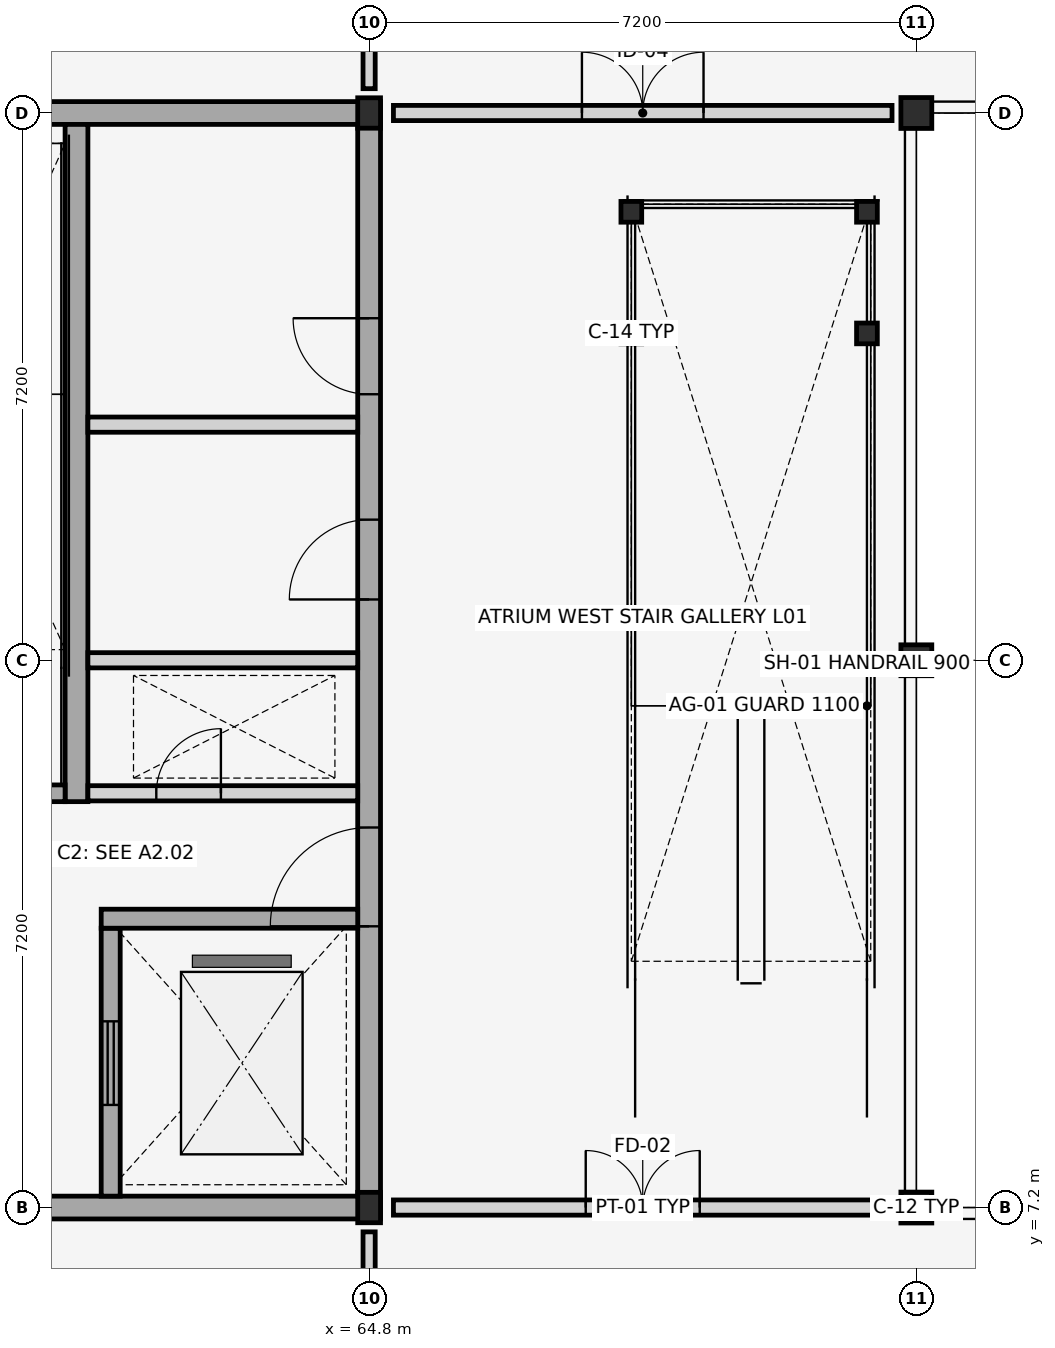
"""IFC4 building model, lengths in metres.
Left out: names, types, materials, properties, quantities, classifications, styles, units other than length and angle.
Written with IfcOpenShell. Run it as: python <this file> out.ifc"""

import sys

from ifc_helpers import new_model, si_unit, direction, frame, frame_2d, origin, origin_2d, place, context, subcontext, project, spatial, rectangle, hollow_circle, i_section, extrude, element, fill, save


model = new_model("IFC4")
c1 = context("Model", 3, precision=1e-05, world=origin(), true_north=direction((0.0, 1.0)))
c2 = subcontext(c1, "Body", "Model", "MODEL_VIEW")
j1 = project(units=[si_unit("LENGTHUNIT", "METRE"), si_unit("PLANEANGLEUNIT", "RADIAN")], contexts=[c1])
p1 = place(None, origin())
s1 = spatial("IfcSite", under=j1, at=p1, CompositionType="ELEMENT")
p2 = place(p1, origin())
s2 = spatial("IfcBuilding", under=s1, at=p2, CompositionType="ELEMENT")
p3 = place(p2, frame((0.0, 0.0, 4.5)))
s3 = spatial("IfcBuildingStorey", under=s2, at=p3, CompositionType="ELEMENT", Elevation=4.5)
for number, where, z_axis, x_axis in (
    (1, (64.8, 7.2, 0.0), (0.0, 0.0, 1.0), (1.0, 0.0, 0.0)),
    (2, (64.8, 21.6, 0.0), (0.0, 0.0, 1.0), (1.0, 0.0, 0.0)),
):
    element("IfcColumn", number, at=place(p3, frame(where, z_axis=z_axis, x_axis=x_axis)), inside=s3, PredefinedType="COLUMN", context=c2, shape_type="SweptSolid", body=[
        extrude(i_section(OverallWidth=0.3, OverallDepth=0.4, WebThickness=0.013, FlangeThickness=0.024, FilletRadius=0.027, at=origin_2d()), origin(), (0.0, 0.0, 1.0), 4.2),
    ])
for number, where, z_axis, x_axis in (
    (3, (72.0, 7.2, 0.0), (0.0, 0.0, 1.0), (0.0, 1.0, 0.0)),
    (4, (72.0, 14.4, 0.0), (0.0, 0.0, 1.0), (1.0, 0.0, 0.0)),
    (5, (72.0, 21.6, 0.0), (0.0, 0.0, 1.0), (0.0, 1.0, 0.0)),
):
    element("IfcColumn", number, at=place(p3, frame(where, z_axis=z_axis, x_axis=x_axis)), inside=s3, PredefinedType="COLUMN", context=c2, shape_type="SweptSolid", body=[
        extrude(hollow_circle(Radius=0.203, WallThickness=0.016, at=origin_2d()), origin(), (0.0, 0.0, 1.0), 4.2),
    ])
for number, where, z_axis, x_axis in (
    (6, (57.6, 7.2, 0.0), (0.0, 0.0, 1.0), (1.0, 0.0, 0.0)),
    (7, (57.6, 21.6, 0.0), (0.0, 0.0, 1.0), (1.0, 0.0, 0.0)),
):
    element("IfcWall", number, at=place(p3, frame(where, z_axis=z_axis, x_axis=x_axis)), inside=s3, PredefinedType="SHEAR", context=c2, shape_type="SweptSolid", body=[
        extrude(rectangle(XDim=7.35, YDim=0.3, at=frame_2d((3.675, 0.0))), origin(), (0.0, 0.0, 1.0), 3.98),
    ])
p4 = place(p3, frame((64.8, 7.35, 0.0), z_axis=(0.0, 0.0, 1.0), x_axis=(0.0, 1.0, 0.0)))
e8 = element("IfcWall", 8, at=p4, inside=s3, PredefinedType="SHEAR", context=c2, shape_type="SweptSolid", body=[
    extrude(rectangle(XDim=14.1, YDim=0.3, at=frame_2d((7.05, 0.0))), origin(), (0.0, 0.0, 1.0), 3.98),
])
p5 = place(p4, frame((3.55, 0.0, 0.0)))
e9 = element("IfcOpeningElement", 9, at=p5, cuts=e8, PredefinedType="OPENING", context=c2, shape_type="SweptSolid", body=[
    extrude(rectangle(XDim=1.3, YDim=2.2, at=frame_2d((0.65, 1.1))), frame((0.0, 0.16, 0.0), z_axis=(0.0, -1.0, 0.0), x_axis=(1.0, 0.0, 0.0)), (0.0, 0.0, 1.0), 0.32),
])
p6 = place(p4, frame((7.85, 0.0, 0.0)))
e10 = element("IfcOpeningElement", 10, at=p6, cuts=e8, PredefinedType="OPENING", context=c2, shape_type="SweptSolid", body=[
    extrude(rectangle(XDim=1.05, YDim=2.15, at=frame_2d((0.525, 1.075))), frame((0.0, 0.16, 0.0), z_axis=(0.0, -1.0, 0.0), x_axis=(1.0, 0.0, 0.0)), (0.0, 0.0, 1.0), 0.32),
])
p7 = place(p4, frame((10.55, 0.0, 0.0)))
e11 = element("IfcOpeningElement", 11, at=p7, cuts=e8, PredefinedType="OPENING", context=c2, shape_type="SweptSolid", body=[
    extrude(rectangle(XDim=1.0, YDim=2.15, at=frame_2d((0.5, 1.075))), frame((0.0, 0.16, 0.0), z_axis=(0.0, -1.0, 0.0), x_axis=(1.0, 0.0, 0.0)), (0.0, 0.0, 1.0), 0.32),
])
p8 = place(p3, frame((61.4, 7.35, 0.0), z_axis=(0.0, 0.0, 1.0), x_axis=(0.0, 1.0, 0.0)))
e12 = element("IfcWall", 12, at=p8, inside=s3, PredefinedType="SHEAR", context=c2, shape_type="SweptSolid", body=[
    extrude(rectangle(XDim=3.525, YDim=0.25, at=frame_2d((1.762, 0.0))), origin(), (0.0, 0.0, 1.0), 3.98),
])
p9 = place(p8, frame((1.2, 0.0, 0.0)))
e13 = element("IfcOpeningElement", 13, at=p9, cuts=e12, PredefinedType="OPENING", context=c2, shape_type="SweptSolid", body=[
    extrude(rectangle(XDim=1.1, YDim=2.15, at=frame_2d((0.55, 1.075))), frame((0.0, 0.135, 0.0), z_axis=(0.0, -1.0, 0.0), x_axis=(1.0, 0.0, 0.0)), (0.0, 0.0, 1.0), 0.27),
])
p10 = place(p3, frame((60.95, 12.54, 0.0), z_axis=(0.0, 0.0, 1.0), x_axis=(0.0, 1.0, 0.0)))
e14 = element("IfcWall", 14, at=p10, inside=s3, PredefinedType="SHEAR", context=c2, shape_type="SweptSolid", body=[
    extrude(rectangle(XDim=8.91, YDim=0.3, at=frame_2d((4.455, 0.0))), origin(), (0.0, 0.0, 1.0), 3.98),
])
p11 = place(p3, frame((61.1, 12.65, 0.0), z_axis=(0.0, 0.0, 1.0), x_axis=(1.0, 0.0, 0.0)))
e15 = element("IfcWall", 15, at=p11, inside=s3, PredefinedType="PLUMBINGWALL", context=c2, shape_type="SweptSolid", body=[
    extrude(rectangle(XDim=3.55, YDim=0.2, at=frame_2d((1.775, 0.0))), origin(), (0.0, 0.0, 1.0), 3.4),
])
p12 = place(p11, frame((0.9, 0.0, 0.0)))
e16 = element("IfcOpeningElement", 16, at=p12, cuts=e15, PredefinedType="OPENING", context=c2, shape_type="SweptSolid", body=[
    extrude(rectangle(XDim=0.85, YDim=2.05, at=frame_2d((0.425, 1.025))), frame((0.0, 0.11, 0.0), z_axis=(0.0, -1.0, 0.0), x_axis=(1.0, 0.0, 0.0)), (0.0, 0.0, 1.0), 0.22),
])
p13 = place(p3, frame((57.9, 12.65, 0.0), z_axis=(0.0, 0.0, 1.0), x_axis=(1.0, 0.0, 0.0)))
e17 = element("IfcWall", 17, at=p13, inside=s3, PredefinedType="SHEAR", context=c2, shape_type="SweptSolid", body=[
    extrude(rectangle(XDim=2.9, YDim=0.22, at=frame_2d((1.45, 0.0))), origin(), (0.0, 0.0, 1.0), 3.98),
])
p14 = place(p13, frame((0.75, 0.0, 0.0)))
e18 = element("IfcOpeningElement", 18, at=p14, cuts=e17, PredefinedType="OPENING", context=c2, shape_type="SweptSolid", body=[
    extrude(rectangle(XDim=1.3, YDim=2.2, at=frame_2d((0.65, 1.1))), frame((0.0, 0.12, 0.0), z_axis=(0.0, -1.0, 0.0), x_axis=(1.0, 0.0, 0.0)), (0.0, 0.0, 1.0), 0.24),
])
p15 = place(p3, frame((61.275, 11.0, 0.0), z_axis=(0.0, 0.0, 1.0), x_axis=(1.0, 0.0, 0.0)))
e19 = element("IfcWall", 19, at=p15, inside=s3, PredefinedType="SHEAR", context=c2, shape_type="SweptSolid", body=[
    extrude(rectangle(XDim=3.375, YDim=0.25, at=frame_2d((1.688, 0.0))), origin(), (0.0, 0.0, 1.0), 3.98),
])
for number, where, z_axis, x_axis in (
    (20, (61.1, 14.4, 0.0), (0.0, 0.0, 1.0), (1.0, 0.0, 0.0)),
    (21, (61.1, 17.5, 0.0), (0.0, 0.0, 1.0), (1.0, 0.0, 0.0)),
):
    element("IfcWall", number, at=place(p3, frame(where, z_axis=z_axis, x_axis=x_axis)), inside=s3, PredefinedType="PLUMBINGWALL", context=c2, shape_type="SweptSolid", body=[
        extrude(rectangle(XDim=3.55, YDim=0.2, at=frame_2d((1.775, 0.0))), origin(), (0.0, 0.0, 1.0), 3.4),
    ])
for number, where, z_axis, x_axis in (
    (22, (68.25, 18.7, 0.0), (0.0, 0.0, 1.0), (1.0, 0.0, 0.0)),
    (23, (71.35, 18.7, 0.0), (0.0, 0.0, 1.0), (1.0, 0.0, 0.0)),
    (24, (68.25, 20.3, 0.0), (0.0, 0.0, 1.0), (1.0, 0.0, 0.0)),
    (25, (71.35, 20.3, 0.0), (0.0, 0.0, 1.0), (1.0, 0.0, 0.0)),
):
    element("IfcColumn", number, at=place(p3, frame(where, z_axis=z_axis, x_axis=x_axis)), inside=s3, PredefinedType="COLUMN", context=c2, shape_type="SweptSolid", body=[
        extrude(hollow_circle(Radius=0.136, WallThickness=0.012, at=origin_2d()), origin(), (0.0, 0.0, 1.0), 4.2),
    ])
p16 = place(p3, frame((65.12, 7.2, 0.0), z_axis=(0.0, 0.0, 1.0), x_axis=(1.0, 0.0, 0.0)))
e26 = element("IfcWall", 26, at=p16, inside=s3, PredefinedType="PARTITIONING", context=c2, shape_type="SweptSolid", body=[
    extrude(rectangle(XDim=6.56, YDim=0.2, at=frame_2d((3.28, 0.0))), origin(), (0.0, 0.0, 1.0), 3.15),
])
p17 = place(p16, frame((2.53, 0.0, 0.0)))
e27 = element("IfcOpeningElement", 27, at=p17, cuts=e26, PredefinedType="OPENING", context=c2, shape_type="SweptSolid", body=[
    extrude(rectangle(XDim=1.5, YDim=2.25, at=frame_2d((0.75, 1.125))), frame((0.0, 0.11, 0.0), z_axis=(0.0, -1.0, 0.0), x_axis=(1.0, 0.0, 0.0)), (0.0, 0.0, 1.0), 0.22),
])
p18 = place(p3, frame((65.12, 21.6, 0.0), z_axis=(0.0, 0.0, 1.0), x_axis=(1.0, 0.0, 0.0)))
e28 = element("IfcWall", 28, at=p18, inside=s3, PredefinedType="PARTITIONING", context=c2, shape_type="SweptSolid", body=[
    extrude(rectangle(XDim=6.56, YDim=0.2, at=frame_2d((3.28, 0.0))), origin(), (0.0, 0.0, 1.0), 3.15),
])
p19 = place(p18, frame((2.48, 0.0, 0.0)))
e29 = element("IfcOpeningElement", 29, at=p19, cuts=e28, PredefinedType="OPENING", context=c2, shape_type="SweptSolid", body=[
    extrude(rectangle(XDim=1.6, YDim=2.35, at=frame_2d((0.8, 1.175))), frame((0.0, 0.11, 0.0), z_axis=(0.0, -1.0, 0.0), x_axis=(1.0, 0.0, 0.0)), (0.0, 0.0, 1.0), 0.22),
])
p20 = place(p3, frame((64.8, 0.32, 0.0), z_axis=(0.0, 0.0, 1.0), x_axis=(0.0, 1.0, 0.0)))
e30 = element("IfcWall", 30, at=p20, inside=s3, PredefinedType="PARTITIONING", context=c2, shape_type="SweptSolid", body=[
    extrude(rectangle(XDim=6.56, YDim=0.16, at=frame_2d((3.28, 0.0))), origin(), (0.0, 0.0, 1.0), 3.15),
])
p21 = place(p20, frame((2.53, 0.0, 0.0)))
e31 = element("IfcOpeningElement", 31, at=p21, cuts=e30, PredefinedType="OPENING", context=c2, shape_type="SweptSolid", body=[
    extrude(rectangle(XDim=1.5, YDim=2.5, at=frame_2d((0.75, 1.25))), frame((0.0, 0.09, 0.0), z_axis=(0.0, -1.0, 0.0), x_axis=(1.0, 0.0, 0.0)), (0.0, 0.0, 1.0), 0.18),
])
p22 = place(p3, frame((64.8, 21.92, 0.0), z_axis=(0.0, 0.0, 1.0), x_axis=(0.0, 1.0, 0.0)))
e32 = element("IfcWall", 32, at=p22, inside=s3, PredefinedType="PARTITIONING", context=c2, shape_type="SweptSolid", body=[
    extrude(rectangle(XDim=6.56, YDim=0.16, at=frame_2d((3.28, 0.0))), origin(), (0.0, 0.0, 1.0), 3.15),
])
p23 = place(p22, frame((2.38, 0.0, 0.0)))
e33 = element("IfcOpeningElement", 33, at=p23, cuts=e32, PredefinedType="OPENING", context=c2, shape_type="SweptSolid", body=[
    extrude(rectangle(XDim=1.8, YDim=2.55, at=frame_2d((0.9, 1.275))), frame((0.0, 0.09, 0.0), z_axis=(0.0, -1.0, 0.0), x_axis=(1.0, 0.0, 0.0)), (0.0, 0.0, 1.0), 0.18),
])
p24 = place(p5, origin())
e34 = element("IfcDoor", 34, at=p24, inside=s3, OperationType="SINGLE_SWING_LEFT", PredefinedType="DOOR", context=c2, shape_type="SweptSolid", body=[
    extrude(rectangle(XDim=1.3, YDim=2.2, at=frame_2d((0.65, 1.1))), frame((0.0, 0.025, 0.0), z_axis=(0.0, -1.0, 0.0), x_axis=(1.0, 0.0, 0.0)), (0.0, 0.0, 1.0), 0.05),
])
fill(e9, e34)
p25 = place(p6, origin())
e35 = element("IfcDoor", 35, at=p25, inside=s3, OperationType="SINGLE_SWING_LEFT", PredefinedType="DOOR", context=c2, shape_type="SweptSolid", body=[
    extrude(rectangle(XDim=1.05, YDim=2.15, at=frame_2d((0.525, 1.075))), frame((0.0, 0.025, 0.0), z_axis=(0.0, -1.0, 0.0), x_axis=(1.0, 0.0, 0.0)), (0.0, 0.0, 1.0), 0.05),
])
fill(e10, e35)
p26 = place(p7, origin())
e36 = element("IfcDoor", 36, at=p26, inside=s3, OperationType="SINGLE_SWING_RIGHT", PredefinedType="DOOR", context=c2, shape_type="SweptSolid", body=[
    extrude(rectangle(XDim=1.0, YDim=2.15, at=frame_2d((0.5, 1.075))), frame((0.0, 0.025, 0.0), z_axis=(0.0, -1.0, 0.0), x_axis=(1.0, 0.0, 0.0)), (0.0, 0.0, 1.0), 0.05),
])
fill(e11, e36)
p27 = place(p9, origin())
e37 = element("IfcDoor", 37, at=p27, inside=s3, OperationType="SLIDING_TO_LEFT", PredefinedType="DOOR", context=c2, shape_type="SweptSolid", body=[
    extrude(rectangle(XDim=1.1, YDim=2.15, at=frame_2d((0.55, 1.075))), frame((0.0, 0.025, 0.0), z_axis=(0.0, -1.0, 0.0), x_axis=(1.0, 0.0, 0.0)), (0.0, 0.0, 1.0), 0.05),
])
fill(e13, e37)
p28 = place(p12, origin())
e38 = element("IfcDoor", 38, at=p28, inside=s3, OperationType="SINGLE_SWING_RIGHT", PredefinedType="TRAPDOOR", context=c2, shape_type="SweptSolid", body=[
    extrude(rectangle(XDim=0.85, YDim=2.05, at=frame_2d((0.425, 1.025))), frame((0.0, 0.025, 0.0), z_axis=(0.0, -1.0, 0.0), x_axis=(1.0, 0.0, 0.0)), (0.0, 0.0, 1.0), 0.05),
])
fill(e16, e38)
p29 = place(p17, origin())
e39 = element("IfcDoor", 39, at=p29, inside=s3, OperationType="DOUBLE_DOOR_SINGLE_SWING", PredefinedType="DOOR", context=c2, shape_type="SweptSolid", body=[
    extrude(rectangle(XDim=1.5, YDim=2.25, at=frame_2d((0.75, 1.125))), frame((0.0, 0.025, 0.0), z_axis=(0.0, -1.0, 0.0), x_axis=(1.0, 0.0, 0.0)), (0.0, 0.0, 1.0), 0.05),
])
fill(e27, e39)
p30 = place(p19, origin())
e40 = element("IfcDoor", 40, at=p30, inside=s3, OperationType="DOUBLE_DOOR_SINGLE_SWING", PredefinedType="DOOR", context=c2, shape_type="SweptSolid", body=[
    extrude(rectangle(XDim=1.6, YDim=2.35, at=frame_2d((0.8, 1.175))), frame((0.0, 0.025, 0.0), z_axis=(0.0, -1.0, 0.0), x_axis=(1.0, 0.0, 0.0)), (0.0, 0.0, 1.0), 0.05),
])
fill(e29, e40)
save(model, sys.argv[1])
